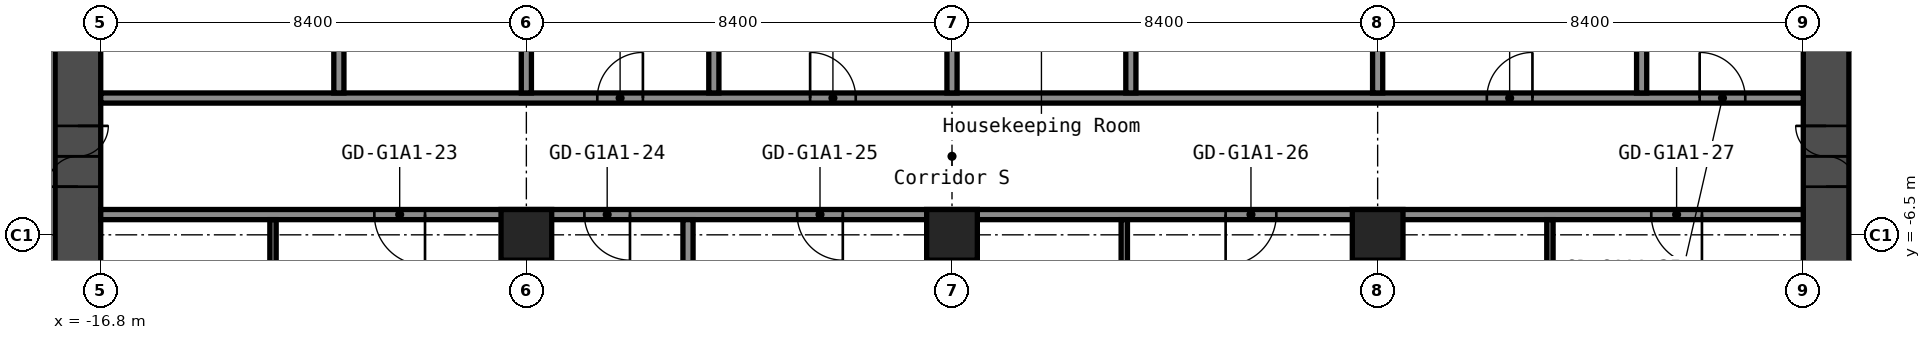
"""IFC4 building model, lengths in metres.
Left out: names, types, materials, properties, quantities, classifications, styles, units other than length and angle.
Written with IfcOpenShell. Run it as: python <this file> out.ifc"""

import sys

from ifc_helpers import new_model, si_unit, direction, frame, frame_2d, origin, origin_2d, place, context, subcontext, project, spatial, rectangle, hollow_rectangle, extrude, element, fill, save


model = new_model("IFC4")
c1 = context("Model", 3, precision=1e-05, world=origin(), true_north=direction((0.0, 1.0)))
c2 = subcontext(c1, "Body", "Model", "MODEL_VIEW")
j1 = project(units=[si_unit("LENGTHUNIT", "METRE"), si_unit("PLANEANGLEUNIT", "RADIAN")], contexts=[c1])
p1 = place(None, origin())
s1 = spatial("IfcSite", under=j1, at=p1, CompositionType="ELEMENT")
p2 = place(p1, origin())
s2 = spatial("IfcBuilding", under=s1, at=p2, CompositionType="ELEMENT")
p3 = place(p2, frame((0.0, 0.0, 35.8)))
s3 = spatial("IfcBuildingStorey", under=s2, at=p3, CompositionType="ELEMENT", Elevation=35.8)
for number, where, z_axis, x_axis in (
    (1, (-8.4, -6.5, 0.0), (0.0, 0.0, 1.0), (1.0, 0.0, 0.0)),
    (2, (0.0, -6.5, 0.0), (0.0, 0.0, 1.0), (1.0, 0.0, 0.0)),
    (3, (8.4, -6.5, 0.0), (0.0, 0.0, 1.0), (1.0, 0.0, 0.0)),
):
    element("IfcColumn", number, at=place(p3, frame(where, z_axis=z_axis, x_axis=x_axis)), inside=s3, PredefinedType="COLUMN", context=c2, shape_type="SweptSolid", body=[
        extrude(hollow_rectangle(XDim=1.0, YDim=1.0, WallThickness=0.04, at=origin_2d()), origin(), (0.0, 0.0, 1.0), 2.8),
    ])
p4 = place(p3, frame((-17.25, -8.4, 0.0), z_axis=(0.0, 0.0, 1.0), x_axis=(0.0, 1.0, 0.0)))
e4 = element("IfcWall", 4, at=p4, inside=s3, PredefinedType="SHEAR", context=c2, shape_type="SweptSolid", body=[
    extrude(rectangle(XDim=16.8, YDim=0.9, at=frame_2d((8.4, 0.0))), origin(), (0.0, 0.0, 1.0), 2.8),
])
p5 = place(p4, frame((12.75, 0.0, 0.0)))
e5 = element("IfcOpeningElement", 5, at=p5, cuts=e4, PredefinedType="OPENING", context=c2, shape_type="SweptSolid", body=[
    extrude(rectangle(XDim=1.2, YDim=2.1, at=frame_2d((0.6, 1.05))), frame((0.0, 0.46, 0.0), z_axis=(0.0, -1.0, 0.0), x_axis=(1.0, 0.0, 0.0)), (0.0, 0.0, 1.0), 0.92),
])
p6 = place(p4, frame((2.85, 0.0, 0.0)))
e6 = element("IfcOpeningElement", 6, at=p6, cuts=e4, PredefinedType="OPENING", context=c2, shape_type="SweptSolid", body=[
    extrude(rectangle(XDim=1.2, YDim=2.1, at=frame_2d((0.6, 1.05))), frame((0.0, 0.46, 0.0), z_axis=(0.0, -1.0, 0.0), x_axis=(1.0, 0.0, 0.0)), (0.0, 0.0, 1.0), 0.92),
])
p7 = place(p3, frame((17.25, -8.4, 0.0), z_axis=(0.0, 0.0, 1.0), x_axis=(0.0, 1.0, 0.0)))
e7 = element("IfcWall", 7, at=p7, inside=s3, PredefinedType="SHEAR", context=c2, shape_type="SweptSolid", body=[
    extrude(rectangle(XDim=16.8, YDim=0.9, at=frame_2d((8.4, 0.0))), origin(), (0.0, 0.0, 1.0), 2.8),
])
p8 = place(p7, frame((12.75, 0.0, 0.0)))
e8 = element("IfcOpeningElement", 8, at=p8, cuts=e7, PredefinedType="OPENING", context=c2, shape_type="SweptSolid", body=[
    extrude(rectangle(XDim=1.2, YDim=2.1, at=frame_2d((0.6, 1.05))), frame((0.0, 0.46, 0.0), z_axis=(0.0, -1.0, 0.0), x_axis=(1.0, 0.0, 0.0)), (0.0, 0.0, 1.0), 0.92),
])
p9 = place(p7, frame((2.85, 0.0, 0.0)))
e9 = element("IfcOpeningElement", 9, at=p9, cuts=e7, PredefinedType="OPENING", context=c2, shape_type="SweptSolid", body=[
    extrude(rectangle(XDim=1.2, YDim=2.1, at=frame_2d((0.6, 1.05))), frame((0.0, 0.46, 0.0), z_axis=(0.0, -1.0, 0.0), x_axis=(1.0, 0.0, 0.0)), (0.0, 0.0, 1.0), 0.92),
])
p10 = place(p3, frame((-16.8, -6.1, 0.0), z_axis=(0.0, 0.0, 1.0), x_axis=(1.0, 0.0, 0.0)))
e10 = element("IfcWall", 10, at=p10, inside=s3, PredefinedType="PARTITIONING", context=c2, shape_type="SweptSolid", body=[
    extrude(rectangle(XDim=33.6, YDim=0.2, at=frame_2d((16.8, 0.0))), origin(), (0.0, 0.0, 1.0), 2.8),
])
p11 = place(p10, frame((5.4, 0.0, 0.0)))
e11 = element("IfcOpeningElement", 11, at=p11, cuts=e10, PredefinedType="OPENING", context=c2, shape_type="SweptSolid", body=[
    extrude(rectangle(XDim=1.0, YDim=2.1, at=frame_2d((0.5, 1.05))), frame((0.0, 0.11, 0.0), z_axis=(0.0, -1.0, 0.0), x_axis=(1.0, 0.0, 0.0)), (0.0, 0.0, 1.0), 0.22),
])
p12 = place(p10, frame((9.545, 0.0, 0.0)))
e12 = element("IfcOpeningElement", 12, at=p12, cuts=e10, PredefinedType="OPENING", context=c2, shape_type="SweptSolid", body=[
    extrude(rectangle(XDim=0.9, YDim=2.1, at=frame_2d((0.45, 1.05))), frame((0.0, 0.11, 0.0), z_axis=(0.0, -1.0, 0.0), x_axis=(1.0, 0.0, 0.0)), (0.0, 0.0, 1.0), 0.22),
])
p13 = place(p10, frame((13.745, 0.0, 0.0)))
e13 = element("IfcOpeningElement", 13, at=p13, cuts=e10, PredefinedType="OPENING", context=c2, shape_type="SweptSolid", body=[
    extrude(rectangle(XDim=0.9, YDim=2.1, at=frame_2d((0.45, 1.05))), frame((0.0, 0.11, 0.0), z_axis=(0.0, -1.0, 0.0), x_axis=(1.0, 0.0, 0.0)), (0.0, 0.0, 1.0), 0.22),
])
p14 = place(p10, frame((22.2, 0.0, 0.0)))
e14 = element("IfcOpeningElement", 14, at=p14, cuts=e10, PredefinedType="OPENING", context=c2, shape_type="SweptSolid", body=[
    extrude(rectangle(XDim=1.0, YDim=2.1, at=frame_2d((0.5, 1.05))), frame((0.0, 0.11, 0.0), z_axis=(0.0, -1.0, 0.0), x_axis=(1.0, 0.0, 0.0)), (0.0, 0.0, 1.0), 0.22),
])
p15 = place(p10, frame((30.6, 0.0, 0.0)))
e15 = element("IfcOpeningElement", 15, at=p15, cuts=e10, PredefinedType="OPENING", context=c2, shape_type="SweptSolid", body=[
    extrude(rectangle(XDim=1.0, YDim=2.1, at=frame_2d((0.5, 1.05))), frame((0.0, 0.11, 0.0), z_axis=(0.0, -1.0, 0.0), x_axis=(1.0, 0.0, 0.0)), (0.0, 0.0, 1.0), 0.22),
])
p16 = place(p3, frame((-16.8, -3.8, 0.0), z_axis=(0.0, 0.0, 1.0), x_axis=(1.0, 0.0, 0.0)))
e16 = element("IfcWall", 16, at=p16, inside=s3, PredefinedType="PARTITIONING", context=c2, shape_type="SweptSolid", body=[
    extrude(rectangle(XDim=33.6, YDim=0.2, at=frame_2d((16.8, 0.0))), origin(), (0.0, 0.0, 1.0), 2.8),
])
p17 = place(p16, frame((9.8, 0.0, 0.0)))
e17 = element("IfcOpeningElement", 17, at=p17, cuts=e16, PredefinedType="OPENING", context=c2, shape_type="SweptSolid", body=[
    extrude(rectangle(XDim=0.9, YDim=2.1, at=frame_2d((0.45, 1.05))), frame((0.0, 0.11, 0.0), z_axis=(0.0, -1.0, 0.0), x_axis=(1.0, 0.0, 0.0)), (0.0, 0.0, 1.0), 0.22),
])
p18 = place(p16, frame((14.0, 0.0, 0.0)))
e18 = element("IfcOpeningElement", 18, at=p18, cuts=e16, PredefinedType="OPENING", context=c2, shape_type="SweptSolid", body=[
    extrude(rectangle(XDim=0.9, YDim=2.1, at=frame_2d((0.45, 1.05))), frame((0.0, 0.11, 0.0), z_axis=(0.0, -1.0, 0.0), x_axis=(1.0, 0.0, 0.0)), (0.0, 0.0, 1.0), 0.22),
])
p19 = place(p16, frame((27.355, 0.0, 0.0)))
e19 = element("IfcOpeningElement", 19, at=p19, cuts=e16, PredefinedType="OPENING", context=c2, shape_type="SweptSolid", body=[
    extrude(rectangle(XDim=0.9, YDim=2.1, at=frame_2d((0.45, 1.05))), frame((0.0, 0.11, 0.0), z_axis=(0.0, -1.0, 0.0), x_axis=(1.0, 0.0, 0.0)), (0.0, 0.0, 1.0), 0.22),
])
p20 = place(p16, frame((31.555, 0.0, 0.0)))
e20 = element("IfcOpeningElement", 20, at=p20, cuts=e16, PredefinedType="OPENING", context=c2, shape_type="SweptSolid", body=[
    extrude(rectangle(XDim=0.9, YDim=2.1, at=frame_2d((0.45, 1.05))), frame((0.0, 0.11, 0.0), z_axis=(0.0, -1.0, 0.0), x_axis=(1.0, 0.0, 0.0)), (0.0, 0.0, 1.0), 0.22),
])
p21 = place(p3, frame((-13.4, -9.5, 0.0), z_axis=(0.0, 0.0, 1.0), x_axis=(0.0, 1.0, 0.0)))
e21 = element("IfcWall", 21, at=p21, inside=s3, PredefinedType="PARTITIONING", context=c2, shape_type="SweptSolid", body=[
    extrude(rectangle(XDim=3.3, YDim=0.125, at=frame_2d((1.65, 0.0))), origin(), (0.0, 0.0, 1.0), 2.8),
])
p22 = place(p3, frame((-12.1, -3.7, 0.0), z_axis=(0.0, 0.0, 1.0), x_axis=(0.0, 1.0, 0.0)))
e22 = element("IfcWall", 22, at=p22, inside=s3, PredefinedType="PARTITIONING", context=c2, shape_type="SweptSolid", body=[
    extrude(rectangle(XDim=7.4, YDim=0.2, at=frame_2d((3.7, 0.0))), origin(), (0.0, 0.0, 1.0), 2.8),
])
p23 = place(p3, frame((-8.4, -20.3, 0.0), z_axis=(0.0, 0.0, 1.0), x_axis=(0.0, 1.0, 0.0)))
e23 = element("IfcWall", 23, at=p23, inside=s3, PredefinedType="PARTITIONING", context=c2, shape_type="SweptSolid", body=[
    extrude(rectangle(XDim=13.31, YDim=0.2, at=frame_2d((6.655, 0.0))), origin(), (0.0, 0.0, 1.0), 2.8),
])
p24 = place(p3, frame((-8.4, -3.7, 0.0), z_axis=(0.0, 0.0, 1.0), x_axis=(0.0, 1.0, 0.0)))
e24 = element("IfcWall", 24, at=p24, inside=s3, PredefinedType="PARTITIONING", context=c2, shape_type="SweptSolid", body=[
    extrude(rectangle(XDim=7.4, YDim=0.2, at=frame_2d((3.7, 0.0))), origin(), (0.0, 0.0, 1.0), 2.8),
])
p25 = place(p3, frame((-5.21, -20.3, 0.0), z_axis=(0.0, 0.0, 1.0), x_axis=(0.0, 1.0, 0.0)))
e25 = element("IfcWall", 25, at=p25, inside=s3, PredefinedType="PARTITIONING", context=c2, shape_type="SweptSolid", body=[
    extrude(rectangle(XDim=14.1, YDim=0.2, at=frame_2d((7.05, 0.0))), origin(), (0.0, 0.0, 1.0), 2.8),
])
p26 = place(p3, frame((-4.7, -3.7, 0.0), z_axis=(0.0, 0.0, 1.0), x_axis=(0.0, 1.0, 0.0)))
e26 = element("IfcWall", 26, at=p26, inside=s3, PredefinedType="PARTITIONING", context=c2, shape_type="SweptSolid", body=[
    extrude(rectangle(XDim=7.4, YDim=0.2, at=frame_2d((3.7, 0.0))), origin(), (0.0, 0.0, 1.0), 2.8),
])
p27 = place(p3, frame((0.0, -20.3, 0.0), z_axis=(0.0, 0.0, 1.0), x_axis=(0.0, 1.0, 0.0)))
e27 = element("IfcWall", 27, at=p27, inside=s3, PredefinedType="PARTITIONING", context=c2, shape_type="SweptSolid", body=[
    extrude(rectangle(XDim=13.31, YDim=0.2, at=frame_2d((6.655, 0.0))), origin(), (0.0, 0.0, 1.0), 2.8),
])
p28 = place(p3, frame((0.0, -3.7, 0.0), z_axis=(0.0, 0.0, 1.0), x_axis=(0.0, 1.0, 0.0)))
e28 = element("IfcWall", 28, at=p28, inside=s3, PredefinedType="PARTITIONING", context=c2, shape_type="SweptSolid", body=[
    extrude(rectangle(XDim=7.4, YDim=0.2, at=frame_2d((3.7, 0.0))), origin(), (0.0, 0.0, 1.0), 2.8),
])
p29 = place(p3, frame((3.4, -9.5, 0.0), z_axis=(0.0, 0.0, 1.0), x_axis=(0.0, 1.0, 0.0)))
e29 = element("IfcWall", 29, at=p29, inside=s3, PredefinedType="PARTITIONING", context=c2, shape_type="SweptSolid", body=[
    extrude(rectangle(XDim=3.3, YDim=0.125, at=frame_2d((1.65, 0.0))), origin(), (0.0, 0.0, 1.0), 2.8),
])
p30 = place(p3, frame((3.53, -3.7, 0.0), z_axis=(0.0, 0.0, 1.0), x_axis=(0.0, 1.0, 0.0)))
e30 = element("IfcWall", 30, at=p30, inside=s3, PredefinedType="PARTITIONING", context=c2, shape_type="SweptSolid", body=[
    extrude(rectangle(XDim=7.4, YDim=0.2, at=frame_2d((3.7, 0.0))), origin(), (0.0, 0.0, 1.0), 2.8),
])
p31 = place(p3, frame((8.4, -20.3, 0.0), z_axis=(0.0, 0.0, 1.0), x_axis=(0.0, 1.0, 0.0)))
e31 = element("IfcWall", 31, at=p31, inside=s3, PredefinedType="PARTITIONING", context=c2, shape_type="SweptSolid", body=[
    extrude(rectangle(XDim=13.31, YDim=0.2, at=frame_2d((6.655, 0.0))), origin(), (0.0, 0.0, 1.0), 2.8),
])
p32 = place(p3, frame((8.4, -3.7, 0.0), z_axis=(0.0, 0.0, 1.0), x_axis=(0.0, 1.0, 0.0)))
e32 = element("IfcWall", 32, at=p32, inside=s3, PredefinedType="PARTITIONING", context=c2, shape_type="SweptSolid", body=[
    extrude(rectangle(XDim=7.4, YDim=0.2, at=frame_2d((3.7, 0.0))), origin(), (0.0, 0.0, 1.0), 2.8),
])
p33 = place(p3, frame((11.8, -9.5, 0.0), z_axis=(0.0, 0.0, 1.0), x_axis=(0.0, 1.0, 0.0)))
e33 = element("IfcWall", 33, at=p33, inside=s3, PredefinedType="PARTITIONING", context=c2, shape_type="SweptSolid", body=[
    extrude(rectangle(XDim=3.3, YDim=0.125, at=frame_2d((1.65, 0.0))), origin(), (0.0, 0.0, 1.0), 2.8),
])
p34 = place(p3, frame((13.61, -3.7, 0.0), z_axis=(0.0, 0.0, 1.0), x_axis=(0.0, 1.0, 0.0)))
e34 = element("IfcWall", 34, at=p34, inside=s3, PredefinedType="PARTITIONING", context=c2, shape_type="SweptSolid", body=[
    extrude(rectangle(XDim=7.4, YDim=0.2, at=frame_2d((3.7, 0.0))), origin(), (0.0, 0.0, 1.0), 2.8),
])
p35 = place(p6, origin())
e35 = element("IfcDoor", 35, at=p35, inside=s3, OperationType="DOUBLE_DOOR_SINGLE_SWING", PredefinedType="DOOR", context=c2, shape_type="SweptSolid", body=[
    extrude(rectangle(XDim=1.2, YDim=2.1, at=frame_2d((0.6, 1.05))), frame((0.0, 0.025, 0.0), z_axis=(0.0, -1.0, 0.0), x_axis=(1.0, 0.0, 0.0)), (0.0, 0.0, 1.0), 0.05),
])
fill(e6, e35)
p36 = place(p9, origin())
e36 = element("IfcDoor", 36, at=p36, inside=s3, OperationType="DOUBLE_DOOR_SINGLE_SWING", PredefinedType="DOOR", context=c2, shape_type="SweptSolid", body=[
    extrude(rectangle(XDim=1.2, YDim=2.1, at=frame_2d((0.6, 1.05))), frame((0.0, 0.025, 0.0), z_axis=(0.0, -1.0, 0.0), x_axis=(1.0, 0.0, 0.0)), (0.0, 0.0, 1.0), 0.05),
])
fill(e9, e36)
p37 = place(p11, origin())
e37 = element("IfcDoor", 37, at=p37, inside=s3, OperationType="SINGLE_SWING_RIGHT", PredefinedType="DOOR", context=c2, shape_type="SweptSolid", body=[
    extrude(rectangle(XDim=1.0, YDim=2.1, at=frame_2d((0.5, 1.05))), frame((0.0, 0.025, 0.0), z_axis=(0.0, -1.0, 0.0), x_axis=(1.0, 0.0, 0.0)), (0.0, 0.0, 1.0), 0.05),
])
fill(e11, e37)
p38 = place(p12, origin())
e38 = element("IfcDoor", 38, at=p38, inside=s3, OperationType="SINGLE_SWING_RIGHT", PredefinedType="DOOR", context=c2, shape_type="SweptSolid", body=[
    extrude(rectangle(XDim=0.9, YDim=2.1, at=frame_2d((0.45, 1.05))), frame((0.0, 0.025, 0.0), z_axis=(0.0, -1.0, 0.0), x_axis=(1.0, 0.0, 0.0)), (0.0, 0.0, 1.0), 0.05),
])
fill(e12, e38)
p39 = place(p13, origin())
e39 = element("IfcDoor", 39, at=p39, inside=s3, OperationType="SINGLE_SWING_RIGHT", PredefinedType="DOOR", context=c2, shape_type="SweptSolid", body=[
    extrude(rectangle(XDim=0.9, YDim=2.1, at=frame_2d((0.45, 1.05))), frame((0.0, 0.025, 0.0), z_axis=(0.0, -1.0, 0.0), x_axis=(1.0, 0.0, 0.0)), (0.0, 0.0, 1.0), 0.05),
])
fill(e13, e39)
p40 = place(p14, origin())
e40 = element("IfcDoor", 40, at=p40, inside=s3, OperationType="SINGLE_SWING_LEFT", PredefinedType="DOOR", context=c2, shape_type="SweptSolid", body=[
    extrude(rectangle(XDim=1.0, YDim=2.1, at=frame_2d((0.5, 1.05))), frame((0.0, 0.025, 0.0), z_axis=(0.0, -1.0, 0.0), x_axis=(1.0, 0.0, 0.0)), (0.0, 0.0, 1.0), 0.05),
])
fill(e14, e40)
p41 = place(p15, origin())
e41 = element("IfcDoor", 41, at=p41, inside=s3, OperationType="SINGLE_SWING_RIGHT", PredefinedType="DOOR", context=c2, shape_type="SweptSolid", body=[
    extrude(rectangle(XDim=1.0, YDim=2.1, at=frame_2d((0.5, 1.05))), frame((0.0, 0.025, 0.0), z_axis=(0.0, -1.0, 0.0), x_axis=(1.0, 0.0, 0.0)), (0.0, 0.0, 1.0), 0.05),
])
fill(e15, e41)
p42 = place(p17, origin())
e42 = element("IfcDoor", 42, at=p42, inside=s3, OperationType="SINGLE_SWING_LEFT", PredefinedType="DOOR", context=c2, shape_type="SweptSolid", body=[
    extrude(rectangle(XDim=0.9, YDim=2.1, at=frame_2d((0.45, 1.05))), frame((0.0, 0.025, 0.0), z_axis=(0.0, -1.0, 0.0), x_axis=(1.0, 0.0, 0.0)), (0.0, 0.0, 1.0), 0.05),
])
fill(e17, e42)
p43 = place(p18, origin())
e43 = element("IfcDoor", 43, at=p43, inside=s3, OperationType="SINGLE_SWING_RIGHT", PredefinedType="DOOR", context=c2, shape_type="SweptSolid", body=[
    extrude(rectangle(XDim=0.9, YDim=2.1, at=frame_2d((0.45, 1.05))), frame((0.0, 0.025, 0.0), z_axis=(0.0, -1.0, 0.0), x_axis=(1.0, 0.0, 0.0)), (0.0, 0.0, 1.0), 0.05),
])
fill(e18, e43)
p44 = place(p19, origin())
e44 = element("IfcDoor", 44, at=p44, inside=s3, OperationType="SINGLE_SWING_LEFT", PredefinedType="DOOR", context=c2, shape_type="SweptSolid", body=[
    extrude(rectangle(XDim=0.9, YDim=2.1, at=frame_2d((0.45, 1.05))), frame((0.0, 0.025, 0.0), z_axis=(0.0, -1.0, 0.0), x_axis=(1.0, 0.0, 0.0)), (0.0, 0.0, 1.0), 0.05),
])
fill(e19, e44)
p45 = place(p20, origin())
e45 = element("IfcDoor", 45, at=p45, inside=s3, OperationType="SINGLE_SWING_RIGHT", PredefinedType="DOOR", context=c2, shape_type="SweptSolid", body=[
    extrude(rectangle(XDim=0.9, YDim=2.1, at=frame_2d((0.45, 1.05))), frame((0.0, 0.025, 0.0), z_axis=(0.0, -1.0, 0.0), x_axis=(1.0, 0.0, 0.0)), (0.0, 0.0, 1.0), 0.05),
])
fill(e20, e45)
save(model, sys.argv[1])
